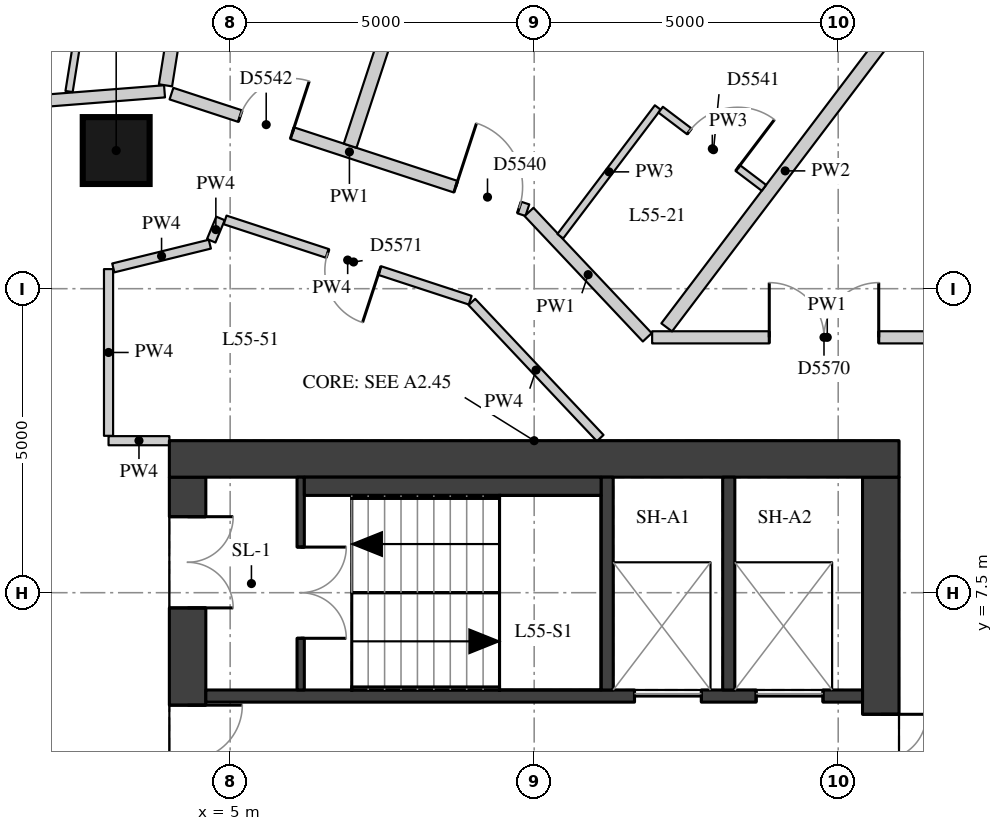
"""IFC4 building model, lengths in metres.
Left out: names, types, materials, properties, quantities, classifications, styles, units other than length and angle.
Written with IfcOpenShell. Run it as: python <this file> out.ifc"""

import sys

from ifc_helpers import new_model, si_unit, direction, frame, frame_2d, origin, origin_2d, place, context, subcontext, project, spatial, rectangle, extrude, element, fill, save


model = new_model("IFC4")
c1 = context("Model", 3, precision=1e-05, world=origin(), true_north=direction((0.0, 1.0)))
c2 = subcontext(c1, "Body", "Model", "MODEL_VIEW")
j1 = project(units=[si_unit("LENGTHUNIT", "METRE"), si_unit("PLANEANGLEUNIT", "RADIAN")], contexts=[c1])
p1 = place(None, origin())
s1 = spatial("IfcSite", under=j1, at=p1, CompositionType="ELEMENT")
p2 = place(p1, origin())
s2 = spatial("IfcBuilding", under=s1, at=p2, CompositionType="ELEMENT")
p3 = place(p2, frame((0.0, 0.0, 195.8)))
s3 = spatial("IfcBuildingStorey", under=s2, at=p3, CompositionType="ELEMENT", Elevation=195.8)
p4 = place(p3, frame((3.126, 14.772, 0.0), z_axis=(0.0, 0.0, 1.0), x_axis=(1.0, 0.0, 0.0)))
e1 = element("IfcColumn", 1, at=p4, inside=s3, PredefinedType="COLUMN", context=c2, shape_type="SweptSolid", body=[
    extrude(rectangle(XDim=1.1, YDim=1.1, at=origin_2d()), origin(), (0.0, 0.0, 1.0), 3.3),
])
p5 = place(p3, frame((4.3, -9.4, 0.0), z_axis=(0.0, 0.0, 1.0), x_axis=(0.0, 1.0, 0.0)))
e2 = element("IfcWall", 2, at=p5, inside=s3, PredefinedType="SHEAR", context=c2, shape_type="SweptSolid", body=[
    extrude(rectangle(XDim=18.8, YDim=0.6, at=frame_2d((9.4, 0.0))), origin(), (0.0, 0.0, 1.0), 3.02),
])
p6 = place(p5, frame((0.65, 0.0, 0.0)))
e3 = element("IfcOpeningElement", 3, at=p6, cuts=e2, PredefinedType="OPENING", context=c2, shape_type="SweptSolid", body=[
    extrude(rectangle(XDim=1.5, YDim=2.1, at=frame_2d((0.75, 1.05))), frame((0.0, 0.31, 0.0), z_axis=(0.0, -1.0, 0.0), x_axis=(1.0, 0.0, 0.0)), (0.0, 0.0, 1.0), 0.62),
])
p7 = place(p5, frame((3.75, 0.0, 0.0)))
e4 = element("IfcOpeningElement", 4, at=p7, cuts=e2, PredefinedType="OPENING", context=c2, shape_type="SweptSolid", body=[
    extrude(rectangle(XDim=1.8, YDim=2.1, at=frame_2d((0.9, 1.05))), frame((0.0, 0.31, 0.0), z_axis=(0.0, -1.0, 0.0), x_axis=(1.0, 0.0, 0.0)), (0.0, 0.0, 1.0), 0.62),
])
p8 = place(p5, frame((6.25, 0.0, 0.0)))
e5 = element("IfcOpeningElement", 5, at=p8, cuts=e2, PredefinedType="OPENING", context=c2, shape_type="SweptSolid", body=[
    extrude(rectangle(XDim=1.1, YDim=2.1, at=frame_2d((0.55, 1.05))), frame((0.0, 0.31, 0.0), z_axis=(0.0, -1.0, 0.0), x_axis=(1.0, 0.0, 0.0)), (0.0, 0.0, 1.0), 0.62),
])
p9 = place(p5, frame((8.9, 0.0, 0.0)))
e6 = element("IfcOpeningElement", 6, at=p9, cuts=e2, PredefinedType="OPENING", context=c2, shape_type="SweptSolid", body=[
    extrude(rectangle(XDim=1.0, YDim=2.1, at=frame_2d((0.5, 1.05))), frame((0.0, 0.31, 0.0), z_axis=(0.0, -1.0, 0.0), x_axis=(1.0, 0.0, 0.0)), (0.0, 0.0, 1.0), 0.62),
])
p10 = place(p5, frame((11.45, 0.0, 0.0)))
e7 = element("IfcOpeningElement", 7, at=p10, cuts=e2, PredefinedType="OPENING", context=c2, shape_type="SweptSolid", body=[
    extrude(rectangle(XDim=1.1, YDim=2.1, at=frame_2d((0.55, 1.05))), frame((0.0, 0.31, 0.0), z_axis=(0.0, -1.0, 0.0), x_axis=(1.0, 0.0, 0.0)), (0.0, 0.0, 1.0), 0.62),
])
p11 = place(p5, frame((13.25, 0.0, 0.0)))
e8 = element("IfcOpeningElement", 8, at=p11, cuts=e2, PredefinedType="OPENING", context=c2, shape_type="SweptSolid", body=[
    extrude(rectangle(XDim=1.8, YDim=2.1, at=frame_2d((0.9, 1.05))), frame((0.0, 0.31, 0.0), z_axis=(0.0, -1.0, 0.0), x_axis=(1.0, 0.0, 0.0)), (0.0, 0.0, 1.0), 0.62),
])
p12 = place(p5, frame((16.65, 0.0, 0.0)))
e9 = element("IfcOpeningElement", 9, at=p12, cuts=e2, PredefinedType="OPENING", context=c2, shape_type="SweptSolid", body=[
    extrude(rectangle(XDim=1.5, YDim=2.1, at=frame_2d((0.75, 1.05))), frame((0.0, 0.31, 0.0), z_axis=(0.0, -1.0, 0.0), x_axis=(1.0, 0.0, 0.0)), (0.0, 0.0, 1.0), 0.62),
])
p13 = place(p3, frame((15.7, -9.4, 0.0), z_axis=(0.0, 0.0, 1.0), x_axis=(0.0, 1.0, 0.0)))
e10 = element("IfcWall", 10, at=p13, inside=s3, PredefinedType="SHEAR", context=c2, shape_type="SweptSolid", body=[
    extrude(rectangle(XDim=18.8, YDim=0.6, at=frame_2d((9.4, 0.0))), origin(), (0.0, 0.0, 1.0), 3.02),
])
p14 = place(p13, frame((13.4, 0.0, 0.0)))
e11 = element("IfcOpeningElement", 11, at=p14, cuts=e10, PredefinedType="OPENING", context=c2, shape_type="SweptSolid", body=[
    extrude(rectangle(XDim=1.5, YDim=2.1, at=frame_2d((0.75, 1.05))), frame((0.0, 0.31, 0.0), z_axis=(0.0, -1.0, 0.0), x_axis=(1.0, 0.0, 0.0)), (0.0, 0.0, 1.0), 0.62),
])
p15 = place(p13, frame((3.9, 0.0, 0.0)))
e12 = element("IfcOpeningElement", 12, at=p15, cuts=e10, PredefinedType="OPENING", context=c2, shape_type="SweptSolid", body=[
    extrude(rectangle(XDim=1.5, YDim=2.1, at=frame_2d((0.75, 1.05))), frame((0.0, 0.31, 0.0), z_axis=(0.0, -1.0, 0.0), x_axis=(1.0, 0.0, 0.0)), (0.0, 0.0, 1.0), 0.62),
])
p16 = place(p3, frame((4.0, 9.7, 0.0), z_axis=(0.0, 0.0, 1.0), x_axis=(1.0, 0.0, 0.0)))
e13 = element("IfcWall", 13, at=p16, inside=s3, PredefinedType="SHEAR", context=c2, shape_type="SweptSolid", body=[
    extrude(rectangle(XDim=12.0, YDim=0.6, at=frame_2d((6.0, 0.0))), origin(), (0.0, 0.0, 1.0), 3.02),
])
p17 = place(p3, frame((4.6, 5.8, 0.0), z_axis=(0.0, 0.0, 1.0), x_axis=(1.0, 0.0, 0.0)))
e14 = element("IfcWall", 14, at=p17, inside=s3, PredefinedType="SHEAR", context=c2, shape_type="SweptSolid", body=[
    extrude(rectangle(XDim=10.8, YDim=0.2, at=frame_2d((5.4, 0.0))), origin(), (0.0, 0.0, 1.0), 3.02),
])
p18 = place(p17, frame((7.05, 0.0, 0.0)))
e15 = element("IfcOpeningElement", 15, at=p18, cuts=e14, PredefinedType="OPENING", context=c2, shape_type="SweptSolid", body=[
    extrude(rectangle(XDim=1.1, YDim=2.1, at=frame_2d((0.55, 1.05))), frame((0.0, 0.11, 0.0), z_axis=(0.0, -1.0, 0.0), x_axis=(1.0, 0.0, 0.0)), (0.0, 0.0, 1.0), 0.22),
])
p19 = place(p17, frame((9.05, 0.0, 0.0)))
e16 = element("IfcOpeningElement", 16, at=p19, cuts=e14, PredefinedType="OPENING", context=c2, shape_type="SweptSolid", body=[
    extrude(rectangle(XDim=1.1, YDim=2.1, at=frame_2d((0.55, 1.05))), frame((0.0, 0.11, 0.0), z_axis=(0.0, -1.0, 0.0), x_axis=(1.0, 0.0, 0.0)), (0.0, 0.0, 1.0), 0.22),
])
for number, where, z_axis, x_axis in (
    (17, (11.2, 5.9, 0.0), (0.0, 0.0, 1.0), (0.0, 1.0, 0.0)),
    (18, (13.2, 5.9, 0.0), (0.0, 0.0, 1.0), (0.0, 1.0, 0.0)),
):
    element("IfcWall", number, at=place(p3, frame(where, z_axis=z_axis, x_axis=x_axis)), inside=s3, PredefinedType="SHEAR", context=c2, shape_type="SweptSolid", body=[
        extrude(rectangle(XDim=3.5, YDim=0.2, at=frame_2d((1.75, 0.0))), origin(), (0.0, 0.0, 1.0), 3.02),
    ])
p20 = place(p3, frame((6.16, 5.9, 0.0), z_axis=(0.0, 0.0, 1.0), x_axis=(0.0, 1.0, 0.0)))
e19 = element("IfcWall", 19, at=p20, inside=s3, PredefinedType="SHEAR", context=c2, shape_type="SweptSolid", body=[
    extrude(rectangle(XDim=3.5, YDim=0.12, at=frame_2d((1.75, 0.0))), origin(), (0.0, 0.0, 1.0), 3.02),
])
p21 = place(p20, frame((0.85, 0.0, 0.0)))
e20 = element("IfcOpeningElement", 20, at=p21, cuts=e19, PredefinedType="OPENING", context=c2, shape_type="SweptSolid", body=[
    extrude(rectangle(XDim=1.5, YDim=2.1, at=frame_2d((0.75, 1.05))), frame((0.0, 0.07, 0.0), z_axis=(0.0, -1.0, 0.0), x_axis=(1.0, 0.0, 0.0)), (0.0, 0.0, 1.0), 0.14),
])
p22 = place(p3, frame((6.22, 9.25, 0.0), z_axis=(0.0, 0.0, 1.0), x_axis=(1.0, 0.0, 0.0)))
e21 = element("IfcWall", 21, at=p22, inside=s3, PredefinedType="PARTITIONING", context=c2, shape_type="SweptSolid", body=[
    extrude(rectangle(XDim=4.88, YDim=0.3, at=frame_2d((2.44, 0.0))), origin(), (0.0, 0.0, 1.0), 3.02),
])
p23 = place(p3, frame((-6.656, 14.915, 0.0), z_axis=(0.0, 0.0, 1.0), x_axis=(0.99693112817, 0.07828362335, 0.0)))
e22 = element("IfcWall", 22, at=p23, inside=s3, PredefinedType="PARTITIONING", context=c2, shape_type="SweptSolid", body=[
    extrude(rectangle(XDim=10.61, YDim=0.2, at=frame_2d((5.305, 0.0))), origin(), (0.0, 0.0, 1.0), 2.42),
])
p24 = place(p23, frame((7.773, 0.0, 0.0)))
e23 = element("IfcOpeningElement", 23, at=p24, cuts=e22, PredefinedType="OPENING", context=c2, shape_type="SweptSolid", body=[
    extrude(rectangle(XDim=0.9, YDim=2.1, at=frame_2d((0.45, 1.05))), frame((0.0, 0.11, 0.0), z_axis=(0.0, -1.0, 0.0), x_axis=(1.0, 0.0, 0.0)), (0.0, 0.0, 1.0), 0.22),
])
p25 = place(p23, frame((4.608, 0.0, 0.0)))
e24 = element("IfcOpeningElement", 24, at=p25, cuts=e22, PredefinedType="OPENING", context=c2, shape_type="SweptSolid", body=[
    extrude(rectangle(XDim=0.9, YDim=2.1, at=frame_2d((0.45, 1.05))), frame((0.0, 0.11, 0.0), z_axis=(0.0, -1.0, 0.0), x_axis=(1.0, 0.0, 0.0)), (0.0, 0.0, 1.0), 0.22),
])
p26 = place(p23, frame((1.632, 0.0, 0.0)))
e25 = element("IfcOpeningElement", 25, at=p26, cuts=e22, PredefinedType="OPENING", context=c2, shape_type="SweptSolid", body=[
    extrude(rectangle(XDim=0.9, YDim=2.1, at=frame_2d((0.45, 1.05))), frame((0.0, 0.11, 0.0), z_axis=(0.0, -1.0, 0.0), x_axis=(1.0, 0.0, 0.0)), (0.0, 0.0, 1.0), 0.22),
])
p27 = place(p3, frame((4.035, 15.708, 0.0), z_axis=(0.0, 0.0, 1.0), x_axis=(0.950331063317, -0.31124085544, 0.0)))
e26 = element("IfcWall", 26, at=p27, inside=s3, PredefinedType="PARTITIONING", context=c2, shape_type="SweptSolid", body=[
    extrude(rectangle(XDim=6.159, YDim=0.2, at=frame_2d((3.08, 0.0))), origin(), (0.0, 0.0, 1.0), 3.02),
])
p28 = place(p27, frame((4.919, 0.0, 0.0)))
e27 = element("IfcOpeningElement", 27, at=p28, cuts=e26, PredefinedType="OPENING", context=c2, shape_type="SweptSolid", body=[
    extrude(rectangle(XDim=1.1, YDim=2.1, at=frame_2d((0.55, 1.05))), frame((0.0, 0.11, 0.0), z_axis=(0.0, -1.0, 0.0), x_axis=(1.0, 0.0, 0.0)), (0.0, 0.0, 1.0), 0.22),
])
p29 = place(p27, frame((1.189, 0.0, 0.0)))
e28 = element("IfcOpeningElement", 28, at=p29, cuts=e26, PredefinedType="OPENING", context=c2, shape_type="SweptSolid", body=[
    extrude(rectangle(XDim=0.9, YDim=2.1, at=frame_2d((0.45, 1.05))), frame((0.0, 0.11, 0.0), z_axis=(0.0, -1.0, 0.0), x_axis=(1.0, 0.0, 0.0)), (0.0, 0.0, 1.0), 0.22),
])
p30 = place(p3, frame((9.916, 13.762, 0.0), z_axis=(0.0, 0.0, 1.0), x_axis=(0.686041532799, -0.727562378958, 0.0)))
e29 = element("IfcWall", 29, at=p30, inside=s3, PredefinedType="PARTITIONING", context=c2, shape_type="SweptSolid", body=[
    extrude(rectangle(XDim=2.834, YDim=0.2, at=frame_2d((1.417, 0.0))), origin(), (0.0, 0.0, 1.0), 3.02),
])
p31 = place(p3, frame((11.94, 11.7, 0.0), z_axis=(0.0, 0.0, 1.0), x_axis=(1.0, 0.0, 0.0)))
e30 = element("IfcWall", 30, at=p31, inside=s3, PredefinedType="PARTITIONING", context=c2, shape_type="SweptSolid", body=[
    extrude(rectangle(XDim=5.76, YDim=0.2, at=frame_2d((2.88, 0.0))), origin(), (0.0, 0.0, 1.0), 3.02),
])
p32 = place(p31, frame((1.927, 0.0, 0.0)))
e31 = element("IfcOpeningElement", 31, at=p32, cuts=e30, PredefinedType="OPENING", context=c2, shape_type="SweptSolid", body=[
    extrude(rectangle(XDim=1.8, YDim=2.1, at=frame_2d((0.9, 1.05))), frame((0.0, 0.11, 0.0), z_axis=(0.0, -1.0, 0.0), x_axis=(1.0, 0.0, 0.0)), (0.0, 0.0, 1.0), 0.22),
])
p33 = place(p3, frame((4.001, 10.0, 0.0), z_axis=(0.0, 0.0, 1.0), x_axis=(-1.0, 0.0, 0.0)))
e32 = element("IfcWall", 32, at=p33, inside=s3, PredefinedType="PARTITIONING", context=c2, shape_type="SweptSolid", body=[
    extrude(rectangle(XDim=1.001, YDim=0.15, at=frame_2d((0.5, 0.0))), origin(), (0.0, 0.0, 1.0), 3.02),
])
p34 = place(p3, frame((3.0, 10.08, 0.0), z_axis=(0.0, 0.0, 1.0), x_axis=(0.0, 1.0, 0.0)))
e33 = element("IfcWall", 33, at=p34, inside=s3, PredefinedType="PARTITIONING", context=c2, shape_type="SweptSolid", body=[
    extrude(rectangle(XDim=2.742, YDim=0.15, at=frame_2d((1.371, 0.0))), origin(), (0.0, 0.0, 1.0), 3.02),
])
p35 = place(p3, frame((3.078, 12.842, 0.0), z_axis=(0.0, 0.0, 1.0), x_axis=(0.9710404657, 0.238915076906, 0.0)))
e34 = element("IfcWall", 34, at=p35, inside=s3, PredefinedType="PARTITIONING", context=c2, shape_type="SweptSolid", body=[
    extrude(rectangle(XDim=1.635, YDim=0.15, at=frame_2d((0.817, 0.0))), origin(), (0.0, 0.0, 1.0), 3.02),
])
p36 = place(p3, frame((4.688, 13.288, 0.0), z_axis=(0.0, 0.0, 1.0), x_axis=(0.38330857492, 0.923620342128, 0.0)))
e35 = element("IfcWall", 35, at=p36, inside=s3, PredefinedType="PARTITIONING", context=c2, shape_type="SweptSolid", body=[
    extrude(rectangle(XDim=0.398, YDim=0.15, at=frame_2d((0.199, 0.0))), origin(), (0.0, 0.0, 1.0), 3.02),
])
p37 = place(p3, frame((4.917, 13.631, 0.0), z_axis=(0.0, 0.0, 1.0), x_axis=(0.950299632499, -0.311336808733, 0.0)))
e36 = element("IfcWall", 36, at=p37, inside=s3, PredefinedType="PARTITIONING", context=c2, shape_type="SweptSolid", body=[
    extrude(rectangle(XDim=4.241, YDim=0.15, at=frame_2d((2.121, 0.0))), origin(), (0.0, 0.0, 1.0), 3.02),
])
p38 = place(p37, frame((1.773, 0.0, 0.0)))
e37 = element("IfcOpeningElement", 37, at=p38, cuts=e36, PredefinedType="OPENING", context=c2, shape_type="SweptSolid", body=[
    extrude(rectangle(XDim=0.9, YDim=2.1, at=frame_2d((0.45, 1.05))), frame((0.0, 0.085, 0.0), z_axis=(0.0, -1.0, 0.0), x_axis=(1.0, 0.0, 0.0)), (0.0, 0.0, 1.0), 0.17),
])
p39 = place(p3, frame((8.975, 12.281, 0.0), z_axis=(0.0, 0.0, 1.0), x_axis=(0.686010468192, -0.727591669503, 0.0)))
e38 = element("IfcWall", 38, at=p39, inside=s3, PredefinedType="PARTITIONING", context=c2, shape_type="SweptSolid", body=[
    extrude(rectangle(XDim=3.077, YDim=0.15, at=frame_2d((1.538, 0.0))), origin(), (0.0, 0.0, 1.0), 3.02),
])
p40 = place(p3, frame((16.077, 17.011, 0.0), z_axis=(0.0, 0.0, 1.0), x_axis=(-0.603635635975, -0.797260320712, 0.0)))
e39 = element("IfcWall", 39, at=p40, inside=s3, PredefinedType="PARTITIONING", context=c2, shape_type="SweptSolid", body=[
    extrude(rectangle(XDim=6.457, YDim=0.22, at=frame_2d((3.229, 0.0))), origin(), (0.0, 0.0, 1.0), 3.02),
])
p41 = place(p3, frame((8.908, 20.743, 0.0), z_axis=(0.0, 0.0, 1.0), x_axis=(-0.311984764468, -0.950087104817, 0.0)))
e40 = element("IfcWall", 40, at=p41, inside=s3, PredefinedType="PARTITIONING", context=c2, shape_type="SweptSolid", body=[
    extrude(rectangle(XDim=6.202, YDim=0.22, at=frame_2d((3.101, 0.0))), origin(), (0.0, 0.0, 1.0), 3.02),
])
p42 = place(p3, frame((4.871, 21.719, 0.0), z_axis=(0.0, 0.0, 1.0), x_axis=(-0.157106861106, -0.987581608878, 0.0)))
e41 = element("IfcWall", 41, at=p42, inside=s3, PredefinedType="PARTITIONING", context=c2, shape_type="SweptSolid", body=[
    extrude(rectangle(XDim=5.949, YDim=0.22, at=frame_2d((2.974, 0.0))), origin(), (0.0, 0.0, 1.0), 2.47),
])
p43 = place(p3, frame((10.43, 13.363, 0.0), z_axis=(0.0, 0.0, 1.0), x_axis=(0.603597479969, 0.797289208616, 0.0)))
e42 = element("IfcWall", 42, at=p43, inside=s3, PredefinedType="PARTITIONING", context=c2, shape_type="SweptSolid", body=[
    extrude(rectangle(XDim=2.656, YDim=0.12, at=frame_2d((1.328, 0.0))), origin(), (0.0, 0.0, 1.0), 3.02),
])
p44 = place(p3, frame((2.351, 15.742, 0.0), z_axis=(0.0, 0.0, 1.0), x_axis=(0.15712488734, 0.987578741052, 0.0)))
e43 = element("IfcWall", 43, at=p44, inside=s3, PredefinedType="PARTITIONING", context=c2, shape_type="SweptSolid", body=[
    extrude(rectangle(XDim=2.75, YDim=0.12, at=frame_2d((1.375, 0.0))), origin(), (0.0, 0.0, 1.0), 2.47),
])
p45 = place(p3, frame((12.081, 15.444, 0.0), z_axis=(0.0, 0.0, 1.0), x_axis=(0.797240905551, -0.603661277967, 0.0)))
e44 = element("IfcWall", 44, at=p45, inside=s3, PredefinedType="PARTITIONING", context=c2, shape_type="SweptSolid", body=[
    extrude(rectangle(XDim=2.13, YDim=0.12, at=frame_2d((1.065, 0.0))), origin(), (0.0, 0.0, 1.0), 3.02),
])
p46 = place(p45, frame((0.59, 0.0, 0.0)))
e45 = element("IfcOpeningElement", 45, at=p46, cuts=e44, PredefinedType="OPENING", context=c2, shape_type="SweptSolid", body=[
    extrude(rectangle(XDim=1.0, YDim=2.1, at=frame_2d((0.5, 1.05))), frame((0.0, 0.07, 0.0), z_axis=(0.0, -1.0, 0.0), x_axis=(1.0, 0.0, 0.0)), (0.0, 0.0, 1.0), 0.14),
])
p47 = place(p11, origin())
e46 = element("IfcDoor", 46, at=p47, inside=s3, OperationType="DOUBLE_DOOR_SINGLE_SWING", PredefinedType="DOOR", context=c2, shape_type="SweptSolid", body=[
    extrude(rectangle(XDim=1.8, YDim=2.1, at=frame_2d((0.9, 1.05))), frame((0.0, 0.025, 0.0), z_axis=(0.0, -1.0, 0.0), x_axis=(1.0, 0.0, 0.0)), (0.0, 0.0, 1.0), 0.05),
])
fill(e8, e46)
p48 = place(p12, origin())
e47 = element("IfcDoor", 47, at=p48, inside=s3, OperationType="DOUBLE_DOOR_SINGLE_SWING", PredefinedType="DOOR", context=c2, shape_type="SweptSolid", body=[
    extrude(rectangle(XDim=1.5, YDim=2.1, at=frame_2d((0.75, 1.05))), frame((0.0, 0.025, 0.0), z_axis=(0.0, -1.0, 0.0), x_axis=(1.0, 0.0, 0.0)), (0.0, 0.0, 1.0), 0.05),
])
fill(e9, e47)
p49 = place(p14, origin())
e48 = element("IfcDoor", 48, at=p49, inside=s3, OperationType="DOUBLE_DOOR_SINGLE_SWING", PredefinedType="DOOR", context=c2, shape_type="SweptSolid", body=[
    extrude(rectangle(XDim=1.5, YDim=2.1, at=frame_2d((0.75, 1.05))), frame((0.0, 0.025, 0.0), z_axis=(0.0, -1.0, 0.0), x_axis=(1.0, 0.0, 0.0)), (0.0, 0.0, 1.0), 0.05),
])
fill(e11, e48)
p50 = place(p21, origin())
e49 = element("IfcDoor", 49, at=p50, inside=s3, OperationType="DOUBLE_DOOR_SINGLE_SWING", PredefinedType="DOOR", context=c2, shape_type="SweptSolid", body=[
    extrude(rectangle(XDim=1.5, YDim=2.1, at=frame_2d((0.75, 1.05))), frame((0.0, 0.025, 0.0), z_axis=(0.0, -1.0, 0.0), x_axis=(1.0, 0.0, 0.0)), (0.0, 0.0, 1.0), 0.05),
])
fill(e20, e49)
p51 = place(p18, origin())
e50 = element("IfcDoor", 50, at=p51, inside=s3, OperationType="DOUBLE_DOOR_SLIDING", PredefinedType="DOOR", context=c2, shape_type="SweptSolid", body=[
    extrude(rectangle(XDim=1.1, YDim=2.1, at=frame_2d((0.55, 1.05))), frame((0.0, 0.025, 0.0), z_axis=(0.0, -1.0, 0.0), x_axis=(1.0, 0.0, 0.0)), (0.0, 0.0, 1.0), 0.05),
])
fill(e15, e50)
p52 = place(p19, origin())
e51 = element("IfcDoor", 51, at=p52, inside=s3, OperationType="DOUBLE_DOOR_SLIDING", PredefinedType="DOOR", context=c2, shape_type="SweptSolid", body=[
    extrude(rectangle(XDim=1.1, YDim=2.1, at=frame_2d((0.55, 1.05))), frame((0.0, 0.025, 0.0), z_axis=(0.0, -1.0, 0.0), x_axis=(1.0, 0.0, 0.0)), (0.0, 0.0, 1.0), 0.05),
])
fill(e16, e51)
p53 = place(p28, origin())
e52 = element("IfcDoor", 52, at=p53, inside=s3, OperationType="SINGLE_SWING_LEFT", PredefinedType="DOOR", context=c2, shape_type="SweptSolid", body=[
    extrude(rectangle(XDim=1.1, YDim=2.1, at=frame_2d((0.55, 1.05))), frame((0.0, 0.025, 0.0), z_axis=(0.0, -1.0, 0.0), x_axis=(1.0, 0.0, 0.0)), (0.0, 0.0, 1.0), 0.05),
])
fill(e27, e52)
p54 = place(p46, origin())
e53 = element("IfcDoor", 53, at=p54, inside=s3, OperationType="SINGLE_SWING_RIGHT", PredefinedType="DOOR", context=c2, shape_type="SweptSolid", body=[
    extrude(rectangle(XDim=1.0, YDim=2.1, at=frame_2d((0.5, 1.05))), frame((0.0, 0.025, 0.0), z_axis=(0.0, -1.0, 0.0), x_axis=(1.0, 0.0, 0.0)), (0.0, 0.0, 1.0), 0.05),
])
fill(e45, e53)
p55 = place(p29, origin())
e54 = element("IfcDoor", 54, at=p55, inside=s3, OperationType="SINGLE_SWING_RIGHT", PredefinedType="DOOR", context=c2, shape_type="SweptSolid", body=[
    extrude(rectangle(XDim=0.9, YDim=2.1, at=frame_2d((0.45, 1.05))), frame((0.0, 0.025, 0.0), z_axis=(0.0, -1.0, 0.0), x_axis=(1.0, 0.0, 0.0)), (0.0, 0.0, 1.0), 0.05),
])
fill(e28, e54)
p56 = place(p32, origin())
e55 = element("IfcDoor", 55, at=p56, inside=s3, OperationType="DOUBLE_DOOR_SINGLE_SWING", PredefinedType="DOOR", context=c2, shape_type="SweptSolid", body=[
    extrude(rectangle(XDim=1.8, YDim=2.1, at=frame_2d((0.9, 1.05))), frame((0.0, 0.025, 0.0), z_axis=(0.0, -1.0, 0.0), x_axis=(1.0, 0.0, 0.0)), (0.0, 0.0, 1.0), 0.05),
])
fill(e31, e55)
p57 = place(p38, origin())
e56 = element("IfcDoor", 56, at=p57, inside=s3, OperationType="SINGLE_SWING_LEFT", PredefinedType="DOOR", context=c2, shape_type="SweptSolid", body=[
    extrude(rectangle(XDim=0.9, YDim=2.1, at=frame_2d((0.45, 1.05))), frame((0.0, 0.025, 0.0), z_axis=(0.0, -1.0, 0.0), x_axis=(1.0, 0.0, 0.0)), (0.0, 0.0, 1.0), 0.05),
])
fill(e37, e56)
save(model, sys.argv[1])
